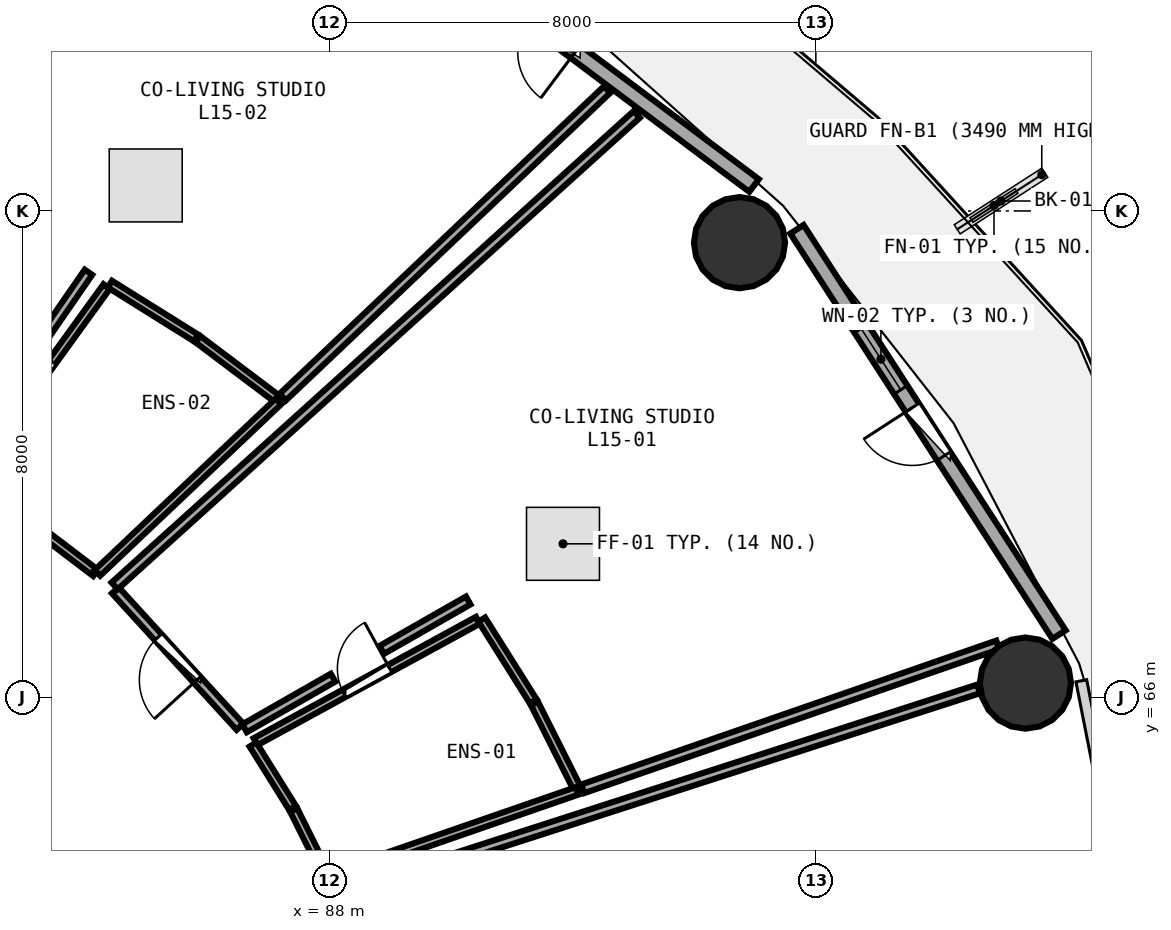
"""IFC4 building model, lengths in metres.
Left out: names, types, materials, properties, quantities, classifications, styles, units other than length and angle.
Written with IfcOpenShell. Run it as: python <this file> out.ifc"""

import sys

from ifc_helpers import new_model, si_unit, direction, frame, frame_2d, origin, origin_2d, place, context, subcontext, project, spatial, rectangle, circle, extrude, element, fill, save


model = new_model("IFC4")
c1 = context("Model", 3, precision=1e-05, world=origin(), true_north=direction((0.0, 1.0)))
c2 = subcontext(c1, "Body", "Model", "MODEL_VIEW")
j1 = project(units=[si_unit("LENGTHUNIT", "METRE"), si_unit("PLANEANGLEUNIT", "RADIAN")], contexts=[c1])
p1 = place(None, origin())
s1 = spatial("IfcSite", under=j1, at=p1, CompositionType="ELEMENT")
p2 = place(p1, origin())
s2 = spatial("IfcBuilding", under=s1, at=p2, CompositionType="ELEMENT")
p3 = place(p2, frame((0.0, 0.0, 60.0)))
s3 = spatial("IfcBuildingStorey", under=s2, at=p3, CompositionType="ELEMENT", Elevation=60.0)
for number, where, z_axis, x_axis in (
    (1, (99.447, 66.236, 0.0), (0.0, 0.0, 1.0), (1.0, 0.0, 0.0)),
    (2, (94.744, 73.478, 0.0), (0.0, 0.0, 1.0), (1.0, 0.0, 0.0)),
):
    element("IfcColumn", number, at=place(p3, frame(where, z_axis=z_axis, x_axis=x_axis)), inside=s3, PredefinedType="COLUMN", context=c2, shape_type="SweptSolid", body=[
        extrude(circle(Radius=0.75, at=origin_2d()), origin(), (0.0, 0.0, 1.0), 3.75),
    ])
p4 = place(p3, frame((99.999, 67.033, 0.0), z_axis=(0.0, 0.0, 1.0), x_axis=(-0.543005114258, 0.839729388488, 0.0)))
e3 = element("IfcWall", 3, at=p4, inside=s3, PredefinedType="SOLIDWALL", context=c2, shape_type="SweptSolid", body=[
    extrude(rectangle(XDim=7.938, YDim=0.26, at=frame_2d((3.969, 0.0))), origin(), (0.0, 0.0, 1.0), 3.475),
])
p5 = place(p4, frame((3.494, 0.0, 0.0)))
e4 = element("IfcOpeningElement", 4, at=p5, cuts=e3, PredefinedType="OPENING", context=c2, shape_type="SweptSolid", body=[
    extrude(rectangle(XDim=0.95, YDim=2.1, at=frame_2d((0.475, 1.05))), frame((0.0, 0.14, 0.0), z_axis=(0.0, -1.0, 0.0), x_axis=(1.0, 0.0, 0.0)), (0.0, 0.0, 1.0), 0.28),
])
p6 = place(p4, frame((4.794, 0.0, 0.85)))
e5 = element("IfcOpeningElement", 5, at=p6, cuts=e3, PredefinedType="OPENING", context=c2, shape_type="SweptSolid", body=[
    extrude(rectangle(XDim=1.2, YDim=1.45, at=frame_2d((0.6, 0.725))), frame((0.0, 0.14, 0.0), z_axis=(0.0, -1.0, 0.0), x_axis=(1.0, 0.0, 0.0)), (0.0, 0.0, 1.0), 0.28),
])
p7 = place(p3, frame((94.984, 74.418, 0.0), z_axis=(0.0, 0.0, 1.0), x_axis=(-0.80030733173, 0.599590005569, 0.0)))
e6 = element("IfcWall", 6, at=p7, inside=s3, PredefinedType="SOLIDWALL", context=c2, shape_type="SweptSolid", body=[
    extrude(rectangle(XDim=8.291, YDim=0.26, at=frame_2d((4.145, 0.0))), origin(), (0.0, 0.0, 1.0), 3.475),
])
p8 = place(p7, frame((3.67, 0.0, 0.0)))
e7 = element("IfcOpeningElement", 7, at=p8, cuts=e6, PredefinedType="OPENING", context=c2, shape_type="SweptSolid", body=[
    extrude(rectangle(XDim=0.95, YDim=2.1, at=frame_2d((0.475, 1.05))), frame((0.0, 0.14, 0.0), z_axis=(0.0, -1.0, 0.0), x_axis=(1.0, 0.0, 0.0)), (0.0, 0.0, 1.0), 0.28),
])
p9 = place(p7, frame((4.97, 0.0, 0.85)))
e8 = element("IfcOpeningElement", 8, at=p9, cuts=e6, PredefinedType="OPENING", context=c2, shape_type="SweptSolid", body=[
    extrude(rectangle(XDim=1.2, YDim=1.45, at=frame_2d((0.6, 0.725))), frame((0.0, 0.14, 0.0), z_axis=(0.0, -1.0, 0.0), x_axis=(1.0, 0.0, 0.0)), (0.0, 0.0, 1.0), 0.28),
])
p10 = place(p3, frame((86.785, 65.272, 0.0), z_axis=(0.0, 0.0, 1.0), x_axis=(0.877747757983, 0.479123025283, 0.0)))
e9 = element("IfcWall", 9, at=p10, inside=s3, PredefinedType="PLUMBINGWALL", context=c2, shape_type="SweptSolid", body=[
    extrude(rectangle(XDim=4.167, YDim=0.13, at=frame_2d((2.083, 0.0))), origin(), (0.0, 0.0, 1.0), 2.875),
])
p11 = place(p10, frame((1.654, 0.0, 0.0)))
e10 = element("IfcOpeningElement", 10, at=p11, cuts=e9, PredefinedType="OPENING", context=c2, shape_type="SweptSolid", body=[
    extrude(rectangle(XDim=0.86, YDim=2.05, at=frame_2d((0.43, 1.025))), frame((0.0, 0.075, 0.0), z_axis=(0.0, -1.0, 0.0), x_axis=(1.0, 0.0, 0.0)), (0.0, 0.0, 1.0), 0.15),
])
p12 = place(p3, frame((86.53, 65.517, 0.0), z_axis=(0.0, 0.0, 1.0), x_axis=(-0.674433052632, 0.738336005839, 0.0)))
e11 = element("IfcWall", 11, at=p12, inside=s3, PredefinedType="PARTITIONING", context=c2, shape_type="SweptSolid", body=[
    extrude(rectangle(XDim=3.041, YDim=0.15, at=frame_2d((1.521, 0.0))), origin(), (0.0, 0.0, 1.0), 2.875),
])
p13 = place(p12, frame((1.046, 0.0, 0.0)))
e12 = element("IfcOpeningElement", 12, at=p13, cuts=e11, PredefinedType="OPENING", context=c2, shape_type="SweptSolid", body=[
    extrude(rectangle(XDim=0.95, YDim=2.08, at=frame_2d((0.475, 1.04))), frame((0.0, 0.085, 0.0), z_axis=(0.0, -1.0, 0.0), x_axis=(1.0, 0.0, 0.0)), (0.0, 0.0, 1.0), 0.17),
])
p14 = place(p3, frame((82.041, 69.583, 0.0), z_axis=(0.0, 0.0, 1.0), x_axis=(0.586113694769, 0.810228817559, 0.0)))
e13 = element("IfcWall", 13, at=p14, inside=s3, PredefinedType="PLUMBINGWALL", context=c2, shape_type="SweptSolid", body=[
    extrude(rectangle(XDim=3.918, YDim=0.13, at=frame_2d((1.959, 0.0))), origin(), (0.0, 0.0, 1.0), 3.235),
])
p15 = place(p14, frame((1.529, 0.0, 0.0)))
e14 = element("IfcOpeningElement", 14, at=p15, cuts=e13, PredefinedType="OPENING", context=c2, shape_type="SweptSolid", body=[
    extrude(rectangle(XDim=0.86, YDim=2.05, at=frame_2d((0.43, 1.025))), frame((0.0, 0.075, 0.0), z_axis=(0.0, -1.0, 0.0), x_axis=(1.0, 0.0, 0.0)), (0.0, 0.0, 1.0), 0.15),
])
p16 = place(p3, frame((87.956, 63.058, 0.0), z_axis=(0.0, 0.0, 1.0), x_axis=(-0.445610682281, 0.895226853841, 0.0)))
e15 = element("IfcWall", 15, at=p16, inside=s3, PredefinedType="PLUMBINGWALL", context=c2, shape_type="SweptSolid", body=[
    extrude(rectangle(XDim=1.219, YDim=0.13, at=frame_2d((0.609, 0.0))), origin(), (0.0, 0.0, 1.0), 3.48),
])
p17 = place(p3, frame((87.393, 64.184, 0.0), z_axis=(0.0, 0.0, 1.0), x_axis=(-0.5296416079, 0.848221531901, 0.0)))
e16 = element("IfcWall", 16, at=p17, inside=s3, PredefinedType="PLUMBINGWALL", context=c2, shape_type="SweptSolid", body=[
    extrude(rectangle(XDim=1.229, YDim=0.13, at=frame_2d((0.614, 0.0))), origin(), (0.0, 0.0, 1.0), 2.875),
])
p18 = place(p3, frame((90.506, 67.28, 0.0), z_axis=(0.0, 0.0, 1.0), x_axis=(0.533000334155, -0.846115029881, 0.0)))
e17 = element("IfcWall", 17, at=p18, inside=s3, PredefinedType="PLUMBINGWALL", context=c2, shape_type="SweptSolid", body=[
    extrude(rectangle(XDim=1.592, YDim=0.13, at=frame_2d((0.796, 0.0))), origin(), (0.0, 0.0, 1.0), 3.48),
])
p19 = place(p3, frame((91.374, 65.898, 0.0), z_axis=(0.0, 0.0, 1.0), x_axis=(0.448882213202, -0.893590934752, 0.0)))
e18 = element("IfcWall", 18, at=p19, inside=s3, PredefinedType="PLUMBINGWALL", context=c2, shape_type="SweptSolid", body=[
    extrude(rectangle(XDim=1.579, YDim=0.13, at=frame_2d((0.79, 0.0))), origin(), (0.0, 0.0, 1.0), 2.875),
])
p20 = place(p3, frame((92.073, 64.462, 0.0), z_axis=(0.0, 0.0, 1.0), x_axis=(-0.944946491884, -0.327224888228, 0.0)))
e19 = element("IfcWall", 19, at=p20, inside=s3, PredefinedType="PLUMBINGWALL", context=c2, shape_type="SweptSolid", body=[
    extrude(rectangle(XDim=4.327, YDim=0.13, at=frame_2d((2.164, 0.0))), origin(), (0.0, 0.0, 1.0), 3.235),
])
p21 = place(p3, frame((84.468, 67.834, 0.0), z_axis=(0.0, 0.0, 1.0), x_axis=(0.742191353367, 0.670188029577, 0.0)))
e20 = element("IfcWall", 20, at=p21, inside=s3, PredefinedType="PARTITIONING", context=c2, shape_type="SweptSolid", body=[
    extrude(rectangle(XDim=11.569, YDim=0.15, at=frame_2d((5.785, 0.0))), origin(), (0.0, 0.0, 1.0), 2.875),
])
p22 = place(p3, frame((98.992, 66.864, 0.0), z_axis=(0.0, 0.0, 1.0), x_axis=(-0.944826855148, -0.327570166212, 0.0)))
e21 = element("IfcWall", 21, at=p22, inside=s3, PredefinedType="PARTITIONING", context=c2, shape_type="SweptSolid", body=[
    extrude(rectangle(XDim=7.224, YDim=0.15, at=frame_2d((3.612, 0.0))), origin(), (0.0, 0.0, 1.0), 2.875),
])
p23 = place(p3, frame((90.283, 67.594, 0.0), z_axis=(0.0, 0.0, 1.0), x_axis=(-0.868279787631, -0.496074803221, 0.0)))
e22 = element("IfcWall", 22, at=p23, inside=s3, PredefinedType="PARTITIONING", context=c2, shape_type="SweptSolid", body=[
    extrude(rectangle(XDim=1.64, YDim=0.15, at=frame_2d((0.82, 0.0))), origin(), (0.0, 0.0, 1.0), 3.48),
])
p24 = place(p3, frame((88.06, 66.324, 0.0), z_axis=(0.0, 0.0, 1.0), x_axis=(-0.86835963742, -0.495935016004, 0.0)))
e23 = element("IfcWall", 23, at=p24, inside=s3, PredefinedType="PARTITIONING", context=c2, shape_type="SweptSolid", body=[
    extrude(rectangle(XDim=1.676, YDim=0.15, at=frame_2d((0.838, 0.0))), origin(), (0.0, 0.0, 1.0), 2.875),
])
p25 = place(p3, frame((84.155, 68.047, 0.0), z_axis=(0.0, 0.0, 1.0), x_axis=(-0.795884944477, 0.605447896317, 0.0)))
e24 = element("IfcWall", 24, at=p25, inside=s3, PredefinedType="PLUMBINGWALL", context=c2, shape_type="SweptSolid", body=[
    extrude(rectangle(XDim=1.273, YDim=0.13, at=frame_2d((0.636, 0.0))), origin(), (0.0, 0.0, 1.0), 2.875),
])
p26 = place(p3, frame((84.39, 72.796, 0.0), z_axis=(0.0, 0.0, 1.0), x_axis=(0.848326822388, -0.529472947766, 0.0)))
e25 = element("IfcWall", 25, at=p26, inside=s3, PredefinedType="PLUMBINGWALL", context=c2, shape_type="SweptSolid", body=[
    extrude(rectangle(XDim=1.669, YDim=0.13, at=frame_2d((0.834, 0.0))), origin(), (0.0, 0.0, 1.0), 2.875),
])
p27 = place(p3, frame((85.839, 71.89, 0.0), z_axis=(0.0, 0.0, 1.0), x_axis=(0.798688091321, -0.601745239102, 0.0)))
e26 = element("IfcWall", 26, at=p27, inside=s3, PredefinedType="PLUMBINGWALL", context=c2, shape_type="SweptSolid", body=[
    extrude(rectangle(XDim=1.655, YDim=0.13, at=frame_2d((0.828, 0.0))), origin(), (0.0, 0.0, 1.0), 3.48),
])
p28 = place(p3, frame((87.163, 70.868, 0.0), z_axis=(0.0, 0.0, 1.0), x_axis=(-0.726077844379, -0.687612509996, 0.0)))
e27 = element("IfcWall", 27, at=p28, inside=s3, PredefinedType="PLUMBINGWALL", context=c2, shape_type="SweptSolid", body=[
    extrude(rectangle(XDim=4.1, YDim=0.13, at=frame_2d((2.05, 0.0))), origin(), (0.0, 0.0, 1.0), 3.235),
])
p29 = place(p3, frame((92.567, 75.997, 0.0), z_axis=(0.0, 0.0, 1.0), x_axis=(-0.725622707533, -0.688092789028, 0.0)))
e28 = element("IfcWall", 28, at=p29, inside=s3, PredefinedType="PARTITIONING", context=c2, shape_type="SweptSolid", body=[
    extrude(rectangle(XDim=7.351, YDim=0.15, at=frame_2d((3.675, 0.0))), origin(), (0.0, 0.0, 1.0), 2.875),
])
p30 = place(p3, frame((84.037, 72.992, 0.0), z_axis=(0.0, 0.0, 1.0), x_axis=(-0.568328597461, -0.822801680424, 0.0)))
e29 = element("IfcWall", 29, at=p30, inside=s3, PredefinedType="PARTITIONING", context=c2, shape_type="SweptSolid", body=[
    extrude(rectangle(XDim=1.513, YDim=0.15, at=frame_2d((0.756, 0.0))), origin(), (0.0, 0.0, 1.0), 3.48),
])
p31 = place(p3, frame((88.134, 62.741, 0.0), z_axis=(0.0, 0.0, 1.0), x_axis=(0.951774856366, 0.30679736438, 0.0)))
e30 = element("IfcWall", 30, at=p31, inside=s3, PredefinedType="PARTITIONING", context=c2, shape_type="SweptSolid", body=[
    extrude(rectangle(XDim=11.078, YDim=0.15, at=frame_2d((5.539, 0.0))), origin(), (0.0, 0.0, 1.0), 2.875),
])
p32 = place(p5, frame((0.95, 0.0, 0.0), z_axis=(0.0, 0.0, 1.0), x_axis=(-1.0, 0.0, 0.0)))
e31 = element("IfcDoor", 31, at=p32, inside=s3, OperationType="SINGLE_SWING_LEFT", PredefinedType="DOOR", context=c2, shape_type="SweptSolid", body=[
    extrude(rectangle(XDim=0.95, YDim=2.1, at=frame_2d((0.475, 1.05))), frame((0.0, 0.025, 0.0), z_axis=(0.0, -1.0, 0.0), x_axis=(1.0, 0.0, 0.0)), (0.0, 0.0, 1.0), 0.05),
])
fill(e4, e31)
p33 = place(p6, origin())
e32 = element("IfcWindow", 32, at=p33, inside=s3, PartitioningType="SINGLE_PANEL", PredefinedType="WINDOW", context=c2, shape_type="SweptSolid", body=[
    extrude(rectangle(XDim=1.2, YDim=1.45, at=frame_2d((0.6, 0.725))), frame((0.0, 0.03, 0.0), z_axis=(0.0, -1.0, 0.0), x_axis=(1.0, 0.0, 0.0)), (0.0, 0.0, 1.0), 0.06),
])
fill(e5, e32)
p34 = place(p8, frame((0.95, 0.0, 0.0), z_axis=(0.0, 0.0, 1.0), x_axis=(-1.0, 0.0, 0.0)))
e33 = element("IfcDoor", 33, at=p34, inside=s3, OperationType="SINGLE_SWING_RIGHT", PredefinedType="DOOR", context=c2, shape_type="SweptSolid", body=[
    extrude(rectangle(XDim=0.95, YDim=2.1, at=frame_2d((0.475, 1.05))), frame((0.0, 0.025, 0.0), z_axis=(0.0, -1.0, 0.0), x_axis=(1.0, 0.0, 0.0)), (0.0, 0.0, 1.0), 0.05),
])
fill(e7, e33)
p35 = place(p11, origin())
e34 = element("IfcDoor", 34, at=p35, inside=s3, OperationType="SINGLE_SWING_RIGHT", PredefinedType="DOOR", context=c2, shape_type="SweptSolid", body=[
    extrude(rectangle(XDim=0.86, YDim=2.05, at=frame_2d((0.43, 1.025))), frame((0.0, 0.025, 0.0), z_axis=(0.0, -1.0, 0.0), x_axis=(1.0, 0.0, 0.0)), (0.0, 0.0, 1.0), 0.05),
])
fill(e10, e34)
p36 = place(p13, origin())
e35 = element("IfcDoor", 35, at=p36, inside=s3, OperationType="SINGLE_SWING_LEFT", PredefinedType="DOOR", context=c2, shape_type="SweptSolid", body=[
    extrude(rectangle(XDim=0.95, YDim=2.08, at=frame_2d((0.475, 1.04))), frame((0.0, 0.025, 0.0), z_axis=(0.0, -1.0, 0.0), x_axis=(1.0, 0.0, 0.0)), (0.0, 0.0, 1.0), 0.05),
])
fill(e12, e35)
p37 = place(p15, origin())
e36 = element("IfcDoor", 36, at=p37, inside=s3, OperationType="SINGLE_SWING_RIGHT", PredefinedType="DOOR", context=c2, shape_type="SweptSolid", body=[
    extrude(rectangle(XDim=0.86, YDim=2.05, at=frame_2d((0.43, 1.025))), frame((0.0, 0.025, 0.0), z_axis=(0.0, -1.0, 0.0), x_axis=(1.0, 0.0, 0.0)), (0.0, 0.0, 1.0), 0.05),
])
fill(e14, e36)
save(model, sys.argv[1])
